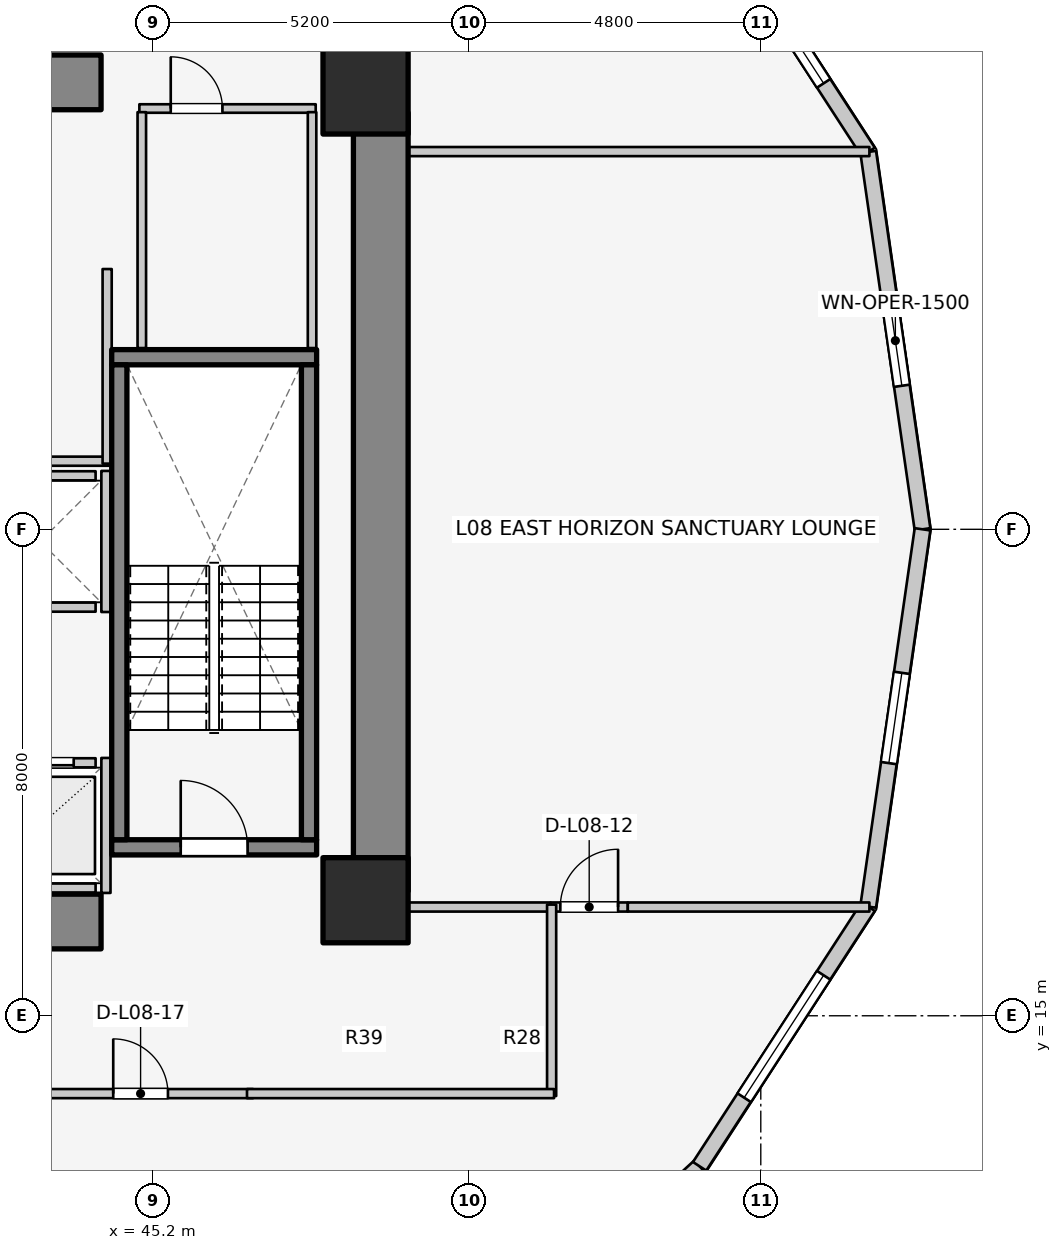
"""IFC4 building model, lengths in metres.
Left out: names, types, materials, properties, quantities, classifications, styles, units other than length and angle.
Written with IfcOpenShell. Run it as: python <this file> out.ifc"""

import sys

from ifc_helpers import new_model, si_unit, direction, frame, frame_2d, origin, origin_2d, place, context, subcontext, project, spatial, rectangle, extrude, element, fill, save


model = new_model("IFC4")
c1 = context("Model", 3, precision=1e-05, world=origin(), true_north=direction((0.0, 1.0)))
c2 = subcontext(c1, "Body", "Model", "MODEL_VIEW")
j1 = project(units=[si_unit("LENGTHUNIT", "METRE"), si_unit("PLANEANGLEUNIT", "RADIAN")], contexts=[c1])
p1 = place(None, origin())
s1 = spatial("IfcSite", under=j1, at=p1, CompositionType="ELEMENT")
p2 = place(p1, origin())
s2 = spatial("IfcBuilding", under=s1, at=p2, CompositionType="ELEMENT")
p3 = place(p2, frame((0.0, 0.0, 30.7)))
s3 = spatial("IfcBuildingStorey", under=s2, at=p3, CompositionType="ELEMENT", Elevation=30.7)
p4 = place(p3, frame((48.95, 17.05, 0.0), z_axis=(0.0, 0.0, 1.0), x_axis=(0.0, 1.0, 0.0)))
e1 = element("IfcWall", 1, at=p4, inside=s3, PredefinedType="SHEAR", context=c2, shape_type="SweptSolid", body=[
    extrude(rectangle(XDim=12.8, YDim=0.9, at=frame_2d((6.4, 0.0))), origin(), (0.0, 0.0, 1.0), 3.1),
])
for number, where, z_axis, x_axis in (
    (2, (39.85, 16.55, 0.0), (0.0, 0.0, 1.0), (1.0, 0.0, 0.0)),
    (3, (39.85, 30.35, 0.0), (0.0, 0.0, 1.0), (1.0, 0.0, 0.0)),
):
    element("IfcWall", number, at=place(p3, frame(where, z_axis=z_axis, x_axis=x_axis)), inside=s3, PredefinedType="SHEAR", context=c2, shape_type="SweptSolid", body=[
        extrude(rectangle(XDim=4.5, YDim=0.9, at=frame_2d((2.25, 0.0))), origin(), (0.0, 0.0, 1.0), 3.1),
    ])
p5 = place(p3, frame((44.525, 17.77, 0.0), z_axis=(0.0, 0.0, 1.0), x_axis=(1.0, 0.0, 0.0)))
e4 = element("IfcWall", 4, at=p5, inside=s3, PredefinedType="SOLIDWALL", context=c2, shape_type="SweptSolid", body=[
    extrude(rectangle(XDim=3.37, YDim=0.25, at=frame_2d((1.685, 0.0))), origin(), (0.0, 0.0, 1.0), 3.1),
])
p6 = place(p5, frame((1.135, 0.0, 0.0)))
e5 = element("IfcOpeningElement", 5, at=p6, cuts=e4, PredefinedType="OPENING", context=c2, shape_type="SweptSolid", body=[
    extrude(rectangle(XDim=1.1, YDim=2.1, at=frame_2d((0.55, 1.05))), frame((0.0, 0.135, 0.0), z_axis=(0.0, -1.0, 0.0), x_axis=(1.0, 0.0, 0.0)), (0.0, 0.0, 1.0), 0.27),
])
p7 = place(p3, frame((44.525, 25.83, 0.0), z_axis=(0.0, 0.0, 1.0), x_axis=(1.0, 0.0, 0.0)))
e6 = element("IfcWall", 6, at=p7, inside=s3, PredefinedType="SOLIDWALL", context=c2, shape_type="SweptSolid", body=[
    extrude(rectangle(XDim=3.37, YDim=0.25, at=frame_2d((1.685, 0.0))), origin(), (0.0, 0.0, 1.0), 3.1),
])
for number, where, z_axis, x_axis in (
    (7, (44.65, 17.895, 0.0), (0.0, 0.0, 1.0), (0.0, 1.0, 0.0)),
    (8, (47.77, 17.895, 0.0), (0.0, 0.0, 1.0), (0.0, 1.0, 0.0)),
):
    element("IfcWall", number, at=place(p3, frame(where, z_axis=z_axis, x_axis=x_axis)), inside=s3, PredefinedType="SOLIDWALL", context=c2, shape_type="SweptSolid", body=[
        extrude(rectangle(XDim=7.81, YDim=0.25, at=frame_2d((3.905, 0.0))), origin(), (0.0, 0.0, 1.0), 3.1),
    ])
for number, where, z_axis, x_axis in (
    (9, (48.7, 16.9, 0.0), (0.0, 0.0, 1.0), (1.0, 0.0, 0.0)),
    (10, (48.7, 30.2, 0.0), (0.0, 0.0, 1.0), (1.0, 0.0, 0.0)),
):
    element("IfcColumn", number, at=place(p3, frame(where, z_axis=z_axis, x_axis=x_axis)), inside=s3, PredefinedType="COLUMN", context=c2, shape_type="SweptSolid", body=[
        extrude(rectangle(XDim=1.4, YDim=1.4, at=origin_2d()), origin(), (0.0, 0.0, 1.0), 3.1),
    ])
p8 = place(p3, frame((57.86, 23.0, 0.0), z_axis=(0.0, 0.0, 1.0), x_axis=(-0.142528001686, 0.989790770181, 0.0)))
e11 = element("IfcWall", 11, at=p8, inside=s3, PredefinedType="STANDARD", context=c2, shape_type="SweptSolid", body=[
    extrude(rectangle(XDim=6.269, YDim=0.26, at=frame_2d((3.135, 0.0))), origin(), (0.0, 0.0, 1.0), 2.85),
])
p9 = place(p8, frame((2.385, 0.0, 0.75)))
e12 = element("IfcOpeningElement", 12, at=p9, cuts=e11, PredefinedType="OPENING", context=c2, shape_type="SweptSolid", body=[
    extrude(rectangle(XDim=1.5, YDim=1.6, at=frame_2d((0.75, 0.8))), frame((0.0, 0.14, 0.0), z_axis=(0.0, -1.0, 0.0), x_axis=(1.0, 0.0, 0.0)), (0.0, 0.0, 1.0), 0.28),
])
p10 = place(p3, frame((56.967, 29.205, 0.0), z_axis=(0.0, 0.0, 1.0), x_axis=(-0.544578722263, 0.838709732421, 0.0)))
e13 = element("IfcWall", 13, at=p10, inside=s3, PredefinedType="STANDARD", context=c2, shape_type="SweptSolid", body=[
    extrude(rectangle(XDim=5.092, YDim=0.26, at=frame_2d((2.546, 0.0))), origin(), (0.0, 0.0, 1.0), 2.85),
])
p11 = place(p10, frame((1.346, 0.0, 0.75)))
e14 = element("IfcOpeningElement", 14, at=p11, cuts=e13, PredefinedType="OPENING", context=c2, shape_type="SweptSolid", body=[
    extrude(rectangle(XDim=2.4, YDim=1.7, at=frame_2d((1.2, 0.85))), frame((0.0, 0.14, 0.0), z_axis=(0.0, -1.0, 0.0), x_axis=(1.0, 0.0, 0.0)), (0.0, 0.0, 1.0), 0.28),
])
p12 = place(p3, frame((50.405, 9.035, 0.0), z_axis=(0.0, 0.0, 1.0), x_axis=(0.735655109293, 0.67735630223, 0.0)))
e15 = element("IfcWall", 15, at=p12, inside=s3, PredefinedType="STANDARD", context=c2, shape_type="SweptSolid", body=[
    extrude(rectangle(XDim=5.151, YDim=0.26, at=frame_2d((2.575, 0.0))), origin(), (0.0, 0.0, 1.0), 2.85),
])
p13 = place(p12, frame((1.825, 0.0, 0.75)))
e16 = element("IfcOpeningElement", 16, at=p13, cuts=e15, PredefinedType="OPENING", context=c2, shape_type="SweptSolid", body=[
    extrude(rectangle(XDim=1.5, YDim=1.6, at=frame_2d((0.75, 0.8))), frame((0.0, 0.14, 0.0), z_axis=(0.0, -1.0, 0.0), x_axis=(1.0, 0.0, 0.0)), (0.0, 0.0, 1.0), 0.28),
])
p14 = place(p3, frame((54.194, 12.524, 0.0), z_axis=(0.0, 0.0, 1.0), x_axis=(0.544578722263, 0.838709732421, 0.0)))
e17 = element("IfcWall", 17, at=p14, inside=s3, PredefinedType="STANDARD", context=c2, shape_type="SweptSolid", body=[
    extrude(rectangle(XDim=5.092, YDim=0.26, at=frame_2d((2.546, 0.0))), origin(), (0.0, 0.0, 1.0), 2.85),
])
p15 = place(p14, frame((1.346, 0.0, 0.75)))
e18 = element("IfcOpeningElement", 18, at=p15, cuts=e17, PredefinedType="OPENING", context=c2, shape_type="SweptSolid", body=[
    extrude(rectangle(XDim=2.4, YDim=1.7, at=frame_2d((1.2, 0.85))), frame((0.0, 0.14, 0.0), z_axis=(0.0, -1.0, 0.0), x_axis=(1.0, 0.0, 0.0)), (0.0, 0.0, 1.0), 0.28),
])
p16 = place(p3, frame((56.967, 16.795, 0.0), z_axis=(0.0, 0.0, 1.0), x_axis=(0.142528001686, 0.989790770181, 0.0)))
e19 = element("IfcWall", 19, at=p16, inside=s3, PredefinedType="STANDARD", context=c2, shape_type="SweptSolid", body=[
    extrude(rectangle(XDim=6.269, YDim=0.26, at=frame_2d((3.135, 0.0))), origin(), (0.0, 0.0, 1.0), 2.85),
])
p17 = place(p16, frame((2.385, 0.0, 0.75)))
e20 = element("IfcOpeningElement", 20, at=p17, cuts=e19, PredefinedType="OPENING", context=c2, shape_type="SweptSolid", body=[
    extrude(rectangle(XDim=1.5, YDim=1.6, at=frame_2d((0.75, 0.8))), frame((0.0, 0.14, 0.0), z_axis=(0.0, -1.0, 0.0), x_axis=(1.0, 0.0, 0.0)), (0.0, 0.0, 1.0), 0.28),
])
p18 = place(p3, frame((42.44, 19.16, 0.0), z_axis=(0.0, 0.0, 1.0), x_axis=(1.0, 0.0, 0.0)))
e21 = element("IfcWall", 21, at=p18, inside=s3, PredefinedType="SOLIDWALL", context=c2, shape_type="SweptSolid", body=[
    extrude(rectangle(XDim=1.82, YDim=0.15, at=frame_2d((0.91, 0.0))), origin(), (0.0, 0.0, 1.0), 2.855),
])
p19 = place(p18, frame((0.36, 0.0, 0.0)))
e22 = element("IfcOpeningElement", 22, at=p19, cuts=e21, PredefinedType="OPENING", context=c2, shape_type="SweptSolid", body=[
    extrude(rectangle(XDim=1.1, YDim=2.1, at=frame_2d((0.55, 1.05))), frame((0.0, 0.085, 0.0), z_axis=(0.0, -1.0, 0.0), x_axis=(1.0, 0.0, 0.0)), (0.0, 0.0, 1.0), 0.17),
])
p20 = place(p3, frame((42.44, 17.1, 0.0), z_axis=(0.0, 0.0, 1.0), x_axis=(1.0, 0.0, 0.0)))
e23 = element("IfcWall", 23, at=p20, inside=s3, PredefinedType="SOLIDWALL", context=c2, shape_type="SweptSolid", body=[
    extrude(rectangle(XDim=1.82, YDim=0.15, at=frame_2d((0.91, 0.0))), origin(), (0.0, 0.0, 1.0), 2.855),
])
p21 = place(p3, frame((44.43, 17.02, 0.0), z_axis=(0.0, 0.0, 1.0), x_axis=(0.0, 1.0, 0.0)))
e24 = element("IfcWall", 24, at=p21, inside=s3, PredefinedType="SOLIDWALL", context=c2, shape_type="SweptSolid", body=[
    extrude(rectangle(XDim=2.22, YDim=0.15, at=frame_2d((1.11, 0.0))), origin(), (0.0, 0.0, 1.0), 2.12),
])
for number, where, z_axis, x_axis in (
    (25, (42.44, 21.72, 0.0), (0.0, 0.0, 1.0), (1.0, 0.0, 0.0)),
    (26, (42.44, 23.88, 0.0), (0.0, 0.0, 1.0), (1.0, 0.0, 0.0)),
):
    element("IfcWall", number, at=place(p3, frame(where, z_axis=z_axis, x_axis=x_axis)), inside=s3, PredefinedType="SOLIDWALL", context=c2, shape_type="SweptSolid", body=[
        extrude(rectangle(XDim=1.82, YDim=0.15, at=frame_2d((0.91, 0.0))), origin(), (0.0, 0.0, 1.0), 2.855),
    ])
p22 = place(p3, frame((44.43, 21.64, 0.0), z_axis=(0.0, 0.0, 1.0), x_axis=(0.0, 1.0, 0.0)))
e27 = element("IfcWall", 27, at=p22, inside=s3, PredefinedType="SOLIDWALL", context=c2, shape_type="SweptSolid", body=[
    extrude(rectangle(XDim=2.32, YDim=0.15, at=frame_2d((1.16, 0.0))), origin(), (0.0, 0.0, 1.0), 2.855),
])
p23 = place(p3, frame((39.4, 24.12, 0.0), z_axis=(0.0, 0.0, 1.0), x_axis=(1.0, 0.0, 0.0)))
e28 = element("IfcWall", 28, at=p23, inside=s3, PredefinedType="PARTITIONING", context=c2, shape_type="SweptSolid", body=[
    extrude(rectangle(XDim=5.08, YDim=0.15, at=frame_2d((2.54, 0.0))), origin(), (0.0, 0.0, 1.0), 2.12),
])
p24 = place(p3, frame((44.45, 24.08, 0.0), z_axis=(0.0, 0.0, 1.0), x_axis=(0.0, 1.0, 0.0)))
e29 = element("IfcWall", 29, at=p24, inside=s3, PredefinedType="PARTITIONING", context=c2, shape_type="SweptSolid", body=[
    extrude(rectangle(XDim=3.2, YDim=0.15, at=frame_2d((1.6, 0.0))), origin(), (0.0, 0.0, 1.0), 2.855),
])
p25 = place(p3, frame((44.98, 29.92, 0.0), z_axis=(0.0, 0.0, 1.0), x_axis=(1.0, 0.0, 0.0)))
e30 = element("IfcWall", 30, at=p25, inside=s3, PredefinedType="PLUMBINGWALL", context=c2, shape_type="SweptSolid", body=[
    extrude(rectangle(XDim=2.9, YDim=0.14, at=frame_2d((1.45, 0.0))), origin(), (0.0, 0.0, 1.0), 2.855),
])
p26 = place(p25, frame((0.516, 0.0, 0.0)))
e31 = element("IfcOpeningElement", 31, at=p26, cuts=e30, PredefinedType="OPENING", context=c2, shape_type="SweptSolid", body=[
    extrude(rectangle(XDim=0.85, YDim=2.05, at=frame_2d((0.425, 1.025))), frame((0.0, 0.08, 0.0), z_axis=(0.0, -1.0, 0.0), x_axis=(1.0, 0.0, 0.0)), (0.0, 0.0, 1.0), 0.16),
])
for number, where, z_axis, x_axis in (
    (32, (45.02, 25.98, 0.0), (0.0, 0.0, 1.0), (0.0, 1.0, 0.0)),
    (33, (47.82, 25.98, 0.0), (0.0, 0.0, 1.0), (0.0, 1.0, 0.0)),
):
    element("IfcWall", number, at=place(p3, frame(where, z_axis=z_axis, x_axis=x_axis)), inside=s3, PredefinedType="PLUMBINGWALL", context=c2, shape_type="SweptSolid", body=[
        extrude(rectangle(XDim=3.88, YDim=0.14, at=frame_2d((1.94, 0.0))), origin(), (0.0, 0.0, 1.0), 2.855),
    ])
p27 = place(p3, frame((48.95, 16.788, 0.0), z_axis=(0.0, 0.0, 1.0), x_axis=(1.0, 0.0, 0.0)))
e34 = element("IfcWall", 34, at=p27, inside=s3, PredefinedType="PARTITIONING", context=c2, shape_type="SweptSolid", body=[
    extrude(rectangle(XDim=2.793, YDim=0.15, at=frame_2d((1.396, 0.0))), origin(), (0.0, 0.0, 1.0), 2.069),
])
p28 = place(p3, frame((51.743, 16.788, 0.0), z_axis=(0.0, 0.0, 1.0), x_axis=(1.0, 0.0, 0.0)))
e35 = element("IfcWall", 35, at=p28, inside=s3, PredefinedType="PARTITIONING", context=c2, shape_type="SweptSolid", body=[
    extrude(rectangle(XDim=1.27, YDim=0.15, at=frame_2d((0.635, 0.0))), origin(), (0.0, 0.0, 1.0), 2.855),
])
p29 = place(p28, frame((0.16, 0.0, 0.0)))
e36 = element("IfcOpeningElement", 36, at=p29, cuts=e35, PredefinedType="OPENING", context=c2, shape_type="SweptSolid", body=[
    extrude(rectangle(XDim=0.95, YDim=2.1, at=frame_2d((0.475, 1.05))), frame((0.0, 0.085, 0.0), z_axis=(0.0, -1.0, 0.0), x_axis=(1.0, 0.0, 0.0)), (0.0, 0.0, 1.0), 0.17),
])
p30 = place(p3, frame((53.013, 16.788, 0.0), z_axis=(0.0, 0.0, 1.0), x_axis=(1.0, 0.0, 0.0)))
e37 = element("IfcWall", 37, at=p30, inside=s3, PredefinedType="PARTITIONING", context=c2, shape_type="SweptSolid", body=[
    extrude(rectangle(XDim=3.973, YDim=0.15, at=frame_2d((1.987, 0.0))), origin(), (0.0, 0.0, 1.0), 2.855),
])
p31 = place(p3, frame((48.95, 29.212, 0.0), z_axis=(0.0, 0.0, 1.0), x_axis=(1.0, 0.0, 0.0)))
e38 = element("IfcWall", 38, at=p31, inside=s3, PredefinedType="PARTITIONING", context=c2, shape_type="SweptSolid", body=[
    extrude(rectangle(XDim=8.036, YDim=0.15, at=frame_2d((4.018, 0.0))), origin(), (0.0, 0.0, 1.0), 2.855),
])
p32 = place(p3, frame((48.95, 29.8, 0.0), z_axis=(0.0, 0.0, 1.0), x_axis=(0.0, 1.0, 0.0)))
e39 = element("IfcWall", 39, at=p32, inside=s3, PredefinedType="PARTITIONING", context=c2, shape_type="SweptSolid", body=[
    extrude(rectangle(XDim=1.29, YDim=0.15, at=frame_2d((0.645, 0.0))), origin(), (0.0, 0.0, 1.0), 2.069),
])
p33 = place(p3, frame((51.76, 13.68, 0.0), z_axis=(0.0, 0.0, 1.0), x_axis=(0.0, 1.0, 0.0)))
e40 = element("IfcWall", 40, at=p33, inside=s3, PredefinedType="PARTITIONING", context=c2, shape_type="SweptSolid", body=[
    extrude(rectangle(XDim=3.148, YDim=0.15, at=frame_2d((1.574, 0.0))), origin(), (0.0, 0.0, 1.0), 2.855),
])
p34 = place(p3, frame((39.33, 13.72, 0.0), z_axis=(0.0, 0.0, 1.0), x_axis=(1.0, 0.0, 0.0)))
e41 = element("IfcWall", 41, at=p34, inside=s3, PredefinedType="PARTITIONING", context=c2, shape_type="SweptSolid", body=[
    extrude(rectangle(XDim=7.52, YDim=0.15, at=frame_2d((3.76, 0.0))), origin(), (0.0, 0.0, 1.0), 2.237),
])
p35 = place(p34, frame((5.22, 0.0, 0.0)))
e42 = element("IfcOpeningElement", 42, at=p35, cuts=e41, PredefinedType="OPENING", context=c2, shape_type="SweptSolid", body=[
    extrude(rectangle(XDim=0.9, YDim=2.1, at=frame_2d((0.45, 1.05))), frame((0.0, 0.085, 0.0), z_axis=(0.0, -1.0, 0.0), x_axis=(1.0, 0.0, 0.0)), (0.0, 0.0, 1.0), 0.17),
])
p36 = place(p3, frame((46.75, 13.72, 0.0), z_axis=(0.0, 0.0, 1.0), x_axis=(1.0, 0.0, 0.0)))
e43 = element("IfcWall", 43, at=p36, inside=s3, PredefinedType="PARTITIONING", context=c2, shape_type="SweptSolid", body=[
    extrude(rectangle(XDim=5.05, YDim=0.15, at=frame_2d((2.525, 0.0))), origin(), (0.0, 0.0, 1.0), 2.069),
])
p37 = place(p3, frame((36.968, 13.569, 0.0), z_axis=(0.0, 0.0, 1.0), x_axis=(0.781055486744, -0.624461629428, 0.0)))
e44 = element("IfcWall", 44, at=p37, inside=s3, PredefinedType="PARTITIONING", context=c2, shape_type="SweptSolid", body=[
    extrude(rectangle(XDim=10.843, YDim=0.18, at=frame_2d((5.422, 0.0))), origin(), (0.0, 0.0, 1.0), 2.237),
])
p38 = place(p9, origin())
e45 = element("IfcWindow", 45, at=p38, inside=s3, PartitioningType="SINGLE_PANEL", PredefinedType="WINDOW", context=c2, shape_type="SweptSolid", body=[
    extrude(rectangle(XDim=1.5, YDim=1.6, at=frame_2d((0.75, 0.8))), frame((0.0, 0.03, 0.0), z_axis=(0.0, -1.0, 0.0), x_axis=(1.0, 0.0, 0.0)), (0.0, 0.0, 1.0), 0.06),
])
fill(e12, e45)
p39 = place(p11, origin())
e46 = element("IfcWindow", 46, at=p39, inside=s3, PartitioningType="SINGLE_PANEL", PredefinedType="WINDOW", context=c2, shape_type="SweptSolid", body=[
    extrude(rectangle(XDim=2.4, YDim=1.7, at=frame_2d((1.2, 0.85))), frame((0.0, 0.03, 0.0), z_axis=(0.0, -1.0, 0.0), x_axis=(1.0, 0.0, 0.0)), (0.0, 0.0, 1.0), 0.06),
])
fill(e14, e46)
p40 = place(p15, origin())
e47 = element("IfcWindow", 47, at=p40, inside=s3, PartitioningType="SINGLE_PANEL", PredefinedType="WINDOW", context=c2, shape_type="SweptSolid", body=[
    extrude(rectangle(XDim=2.4, YDim=1.7, at=frame_2d((1.2, 0.85))), frame((0.0, 0.03, 0.0), z_axis=(0.0, -1.0, 0.0), x_axis=(1.0, 0.0, 0.0)), (0.0, 0.0, 1.0), 0.06),
])
fill(e18, e47)
p41 = place(p17, origin())
e48 = element("IfcWindow", 48, at=p41, inside=s3, PartitioningType="SINGLE_PANEL", PredefinedType="WINDOW", context=c2, shape_type="SweptSolid", body=[
    extrude(rectangle(XDim=1.5, YDim=1.6, at=frame_2d((0.75, 0.8))), frame((0.0, 0.03, 0.0), z_axis=(0.0, -1.0, 0.0), x_axis=(1.0, 0.0, 0.0)), (0.0, 0.0, 1.0), 0.06),
])
fill(e20, e48)
p42 = place(p6, origin())
e49 = element("IfcDoor", 49, at=p42, inside=s3, OperationType="SINGLE_SWING_LEFT", PredefinedType="DOOR", context=c2, shape_type="SweptSolid", body=[
    extrude(rectangle(XDim=1.1, YDim=2.1, at=frame_2d((0.55, 1.05))), frame((0.0, 0.025, 0.0), z_axis=(0.0, -1.0, 0.0), x_axis=(1.0, 0.0, 0.0)), (0.0, 0.0, 1.0), 0.05),
])
fill(e5, e49)
p43 = place(p19, origin())
e50 = element("IfcDoor", 50, at=p43, inside=s3, OperationType="DOUBLE_DOOR_SLIDING", PredefinedType="DOOR", context=c2, shape_type="SweptSolid", body=[
    extrude(rectangle(XDim=1.1, YDim=2.1, at=frame_2d((0.55, 1.05))), frame((0.0, 0.025, 0.0), z_axis=(0.0, -1.0, 0.0), x_axis=(1.0, 0.0, 0.0)), (0.0, 0.0, 1.0), 0.05),
])
fill(e22, e50)
p44 = place(p26, origin())
e51 = element("IfcDoor", 51, at=p44, inside=s3, OperationType="SINGLE_SWING_LEFT", PredefinedType="DOOR", context=c2, shape_type="SweptSolid", body=[
    extrude(rectangle(XDim=0.85, YDim=2.05, at=frame_2d((0.425, 1.025))), frame((0.0, 0.025, 0.0), z_axis=(0.0, -1.0, 0.0), x_axis=(1.0, 0.0, 0.0)), (0.0, 0.0, 1.0), 0.05),
])
fill(e31, e51)
p45 = place(p29, origin())
e52 = element("IfcDoor", 52, at=p45, inside=s3, OperationType="SINGLE_SWING_RIGHT", PredefinedType="DOOR", context=c2, shape_type="SweptSolid", body=[
    extrude(rectangle(XDim=0.95, YDim=2.1, at=frame_2d((0.475, 1.05))), frame((0.0, 0.025, 0.0), z_axis=(0.0, -1.0, 0.0), x_axis=(1.0, 0.0, 0.0)), (0.0, 0.0, 1.0), 0.05),
])
fill(e36, e52)
p46 = place(p35, origin())
e53 = element("IfcDoor", 53, at=p46, inside=s3, OperationType="SINGLE_SWING_LEFT", PredefinedType="DOOR", context=c2, shape_type="SweptSolid", body=[
    extrude(rectangle(XDim=0.9, YDim=2.1, at=frame_2d((0.45, 1.05))), frame((0.0, 0.025, 0.0), z_axis=(0.0, -1.0, 0.0), x_axis=(1.0, 0.0, 0.0)), (0.0, 0.0, 1.0), 0.05),
])
fill(e42, e53)
save(model, sys.argv[1])
